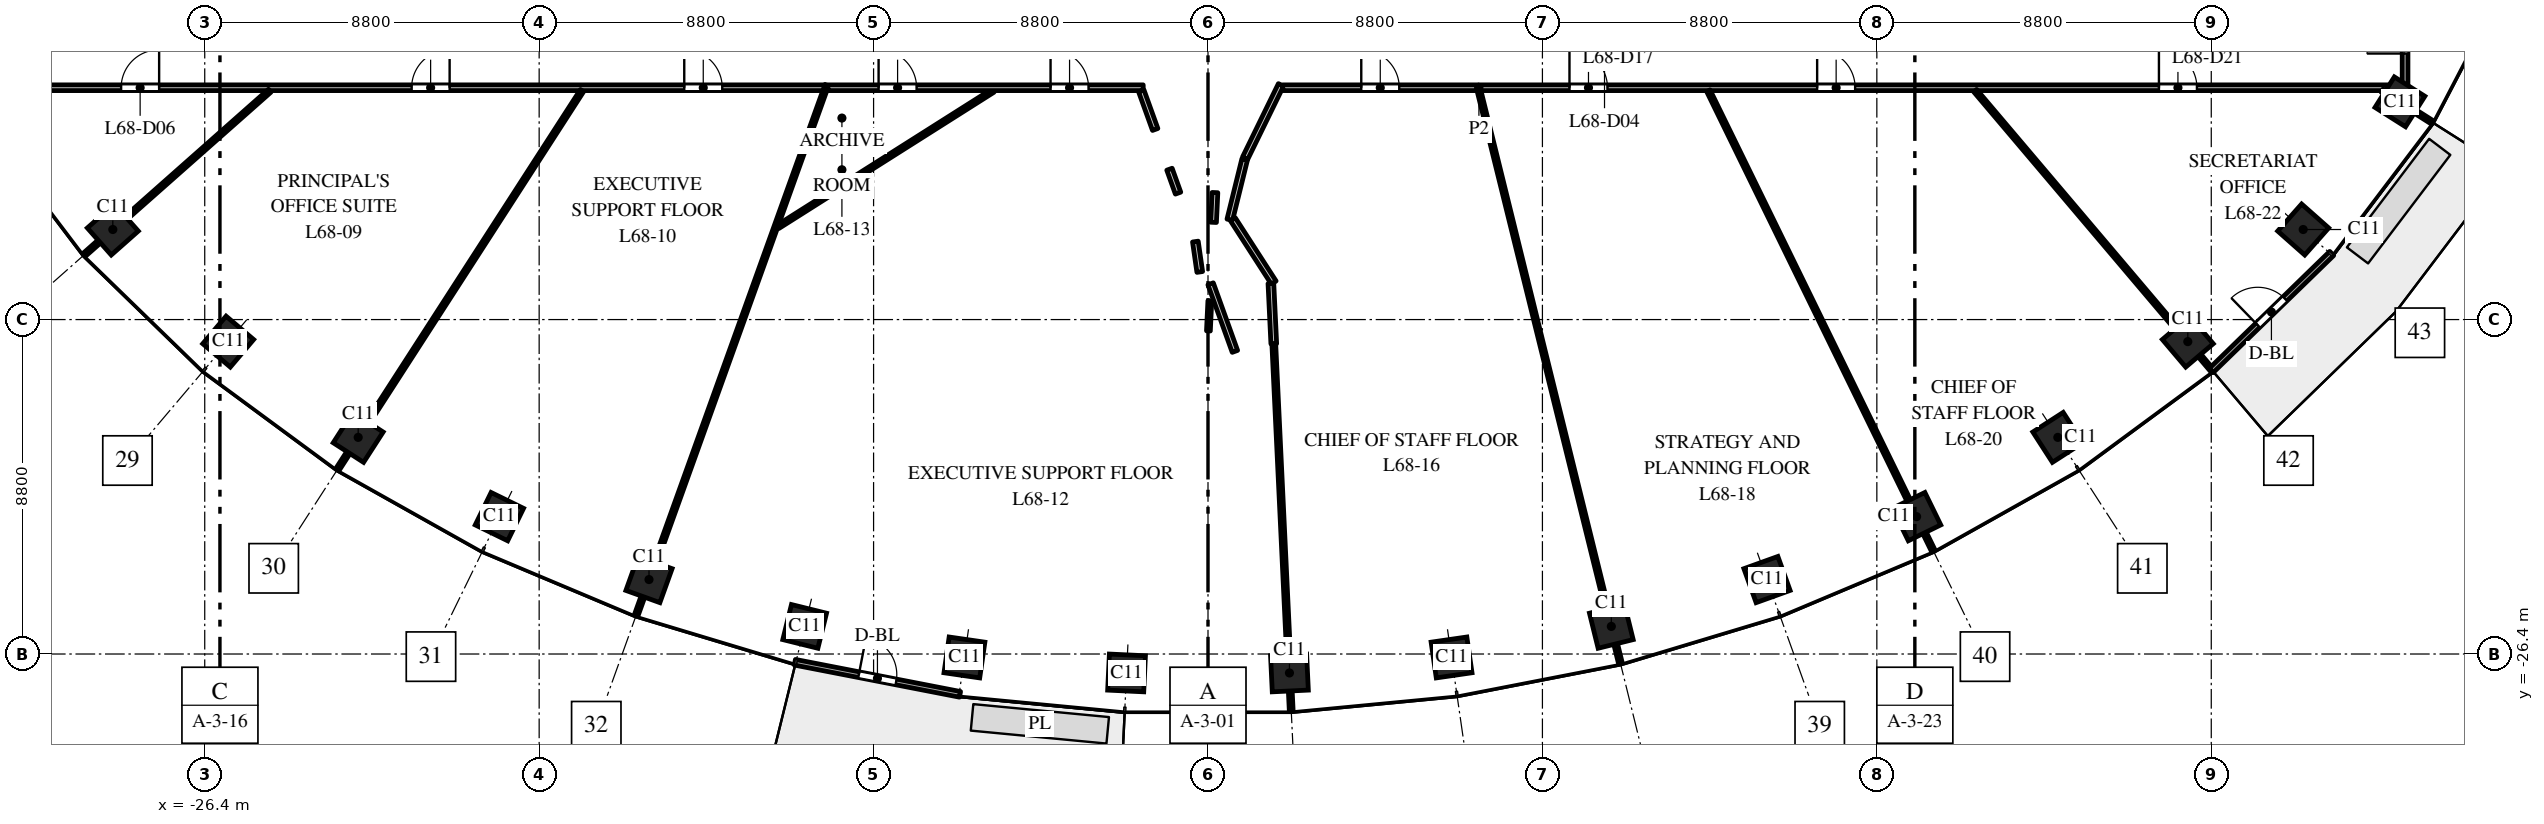
"""IFC4 building model, lengths in metres.
Left out: names, types, materials, properties, quantities, classifications, styles, units other than length and angle.
Written with IfcOpenShell. Run it as: python <this file> out.ifc"""

import sys

from ifc_helpers import new_model, si_unit, direction, frame, frame_2d, origin, origin_2d, place, context, subcontext, project, spatial, rectangle, extrude, element, fill, save


model = new_model("IFC4")
c1 = context("Model", 3, precision=1e-05, world=origin(), true_north=direction((0.0, 1.0)))
c2 = subcontext(c1, "Body", "Model", "MODEL_VIEW")
j1 = project(units=[si_unit("LENGTHUNIT", "METRE"), si_unit("PLANEANGLEUNIT", "RADIAN")], contexts=[c1])
p1 = place(None, origin())
s1 = spatial("IfcSite", under=j1, at=p1, CompositionType="ELEMENT")
p2 = place(p1, origin())
s2 = spatial("IfcBuilding", under=s1, at=p2, CompositionType="ELEMENT")
p3 = place(p2, frame((0.0, 0.0, 315.0)))
s3 = spatial("IfcBuildingStorey", under=s2, at=p3, CompositionType="ELEMENT", Elevation=315.0)
for number, where, z_axis, x_axis in (
    (1, (-28.819, -15.23, 0.0), (0.0, 0.0, 1.0), (0.663, -0.749, 0.0)),
    (2, (-25.783, -18.18, 0.0), (0.0, 0.0, 1.0), (0.763, -0.646, 0.0)),
    (3, (-22.362, -20.7, 0.0), (0.0, 0.0, 1.0), (0.84, -0.542, 0.0)),
    (4, (-18.646, -22.785, 0.0), (0.0, 0.0, 1.0), (0.898, -0.439, 0.0)),
    (5, (-14.709, -24.441, 0.0), (0.0, 0.0, 1.0), (0.941, -0.338, 0.0)),
    (6, (-10.613, -25.674, 0.0), (0.0, 0.0, 1.0), (0.971, -0.24, 0.0)),
    (7, (-6.409, -26.491, 0.0), (0.0, 0.0, 1.0), (0.99, -0.143, 0.0)),
    (8, (-2.143, -26.898, 0.0), (0.0, 0.0, 1.0), (0.999, -0.048, 0.0)),
    (9, (2.143, -26.898, 0.0), (0.0, 0.0, 1.0), (0.999, 0.048, 0.0)),
    (10, (6.409, -26.491, 0.0), (0.0, 0.0, 1.0), (0.99, 0.143, 0.0)),
    (11, (10.613, -25.674, 0.0), (0.0, 0.0, 1.0), (0.971, 0.24, 0.0)),
    (12, (14.709, -24.441, 0.0), (0.0, 0.0, 1.0), (0.941, 0.338, 0.0)),
    (13, (18.646, -22.785, 0.0), (0.0, 0.0, 1.0), (0.898, 0.439, 0.0)),
    (14, (22.362, -20.7, 0.0), (0.0, 0.0, 1.0), (0.84, 0.542, 0.0)),
    (15, (25.783, -18.18, 0.0), (0.0, 0.0, 1.0), (0.763, 0.646, 0.0)),
    (16, (28.819, -15.23, 0.0), (0.0, 0.0, 1.0), (0.663, 0.749, 0.0)),
    (17, (31.365, -11.871, 0.0), (0.0, 0.0, 1.0), (0.535, 0.845, 0.0)),
):
    element("IfcColumn", number, at=place(p3, frame(where, z_axis=z_axis, x_axis=x_axis)), inside=s3, PredefinedType="COLUMN", context=c2, shape_type="SweptSolid", body=[
        extrude(rectangle(XDim=0.95, YDim=0.95, at=origin_2d()), origin(), (0.0, 0.0, 1.0), 4.0),
    ])
p4 = place(p3, frame((-10.871, -26.617, 0.0), z_axis=(0.0, 0.0, 1.0), x_axis=(0.981631174778, -0.190788460615, 0.0)))
e18 = element("IfcWall", 18, at=p4, inside=s3, PredefinedType="STANDARD", context=c2, shape_type="SweptSolid", body=[
    extrude(rectangle(XDim=4.426, YDim=0.15, at=frame_2d((2.213, 0.0))), origin(), (0.0, 0.0, 1.0), 3.7),
])
p5 = place(p4, frame((1.713, 0.0, 0.0)))
e19 = element("IfcOpeningElement", 19, at=p5, cuts=e18, PredefinedType="OPENING", context=c2, shape_type="SweptSolid", body=[
    extrude(rectangle(XDim=1.0, YDim=2.4, at=frame_2d((0.5, 1.2))), frame((0.0, 0.085, 0.0), z_axis=(0.0, -1.0, 0.0), x_axis=(1.0, 0.0, 0.0)), (0.0, 0.0, 1.0), 0.17),
])
p6 = place(p3, frame((26.396, -18.943, 0.0), z_axis=(0.0, 0.0, 1.0), x_axis=(0.717214761864, 0.696852197647, 0.0)))
e20 = element("IfcWall", 20, at=p6, inside=s3, PredefinedType="STANDARD", context=c2, shape_type="SweptSolid", body=[
    extrude(rectangle(XDim=4.424, YDim=0.15, at=frame_2d((2.212, 0.0))), origin(), (0.0, 0.0, 1.0), 3.7),
])
p7 = place(p6, frame((1.712, 0.0, 0.0)))
e21 = element("IfcOpeningElement", 21, at=p7, cuts=e20, PredefinedType="OPENING", context=c2, shape_type="SweptSolid", body=[
    extrude(rectangle(XDim=1.0, YDim=2.4, at=frame_2d((0.5, 1.2))), frame((0.0, 0.085, 0.0), z_axis=(0.0, -1.0, 0.0), x_axis=(1.0, 0.0, 0.0)), (0.0, 0.0, 1.0), 0.17),
])
p8 = place(p3, frame((-31.5, -11.5, 0.0), z_axis=(0.0, 0.0, 1.0), x_axis=(1.0, 0.0, 0.0)))
e22 = element("IfcWall", 22, at=p8, inside=s3, PredefinedType="PARTITIONING", context=c2, shape_type="SweptSolid", body=[
    extrude(rectangle(XDim=21.432, YDim=0.15, at=frame_2d((10.716, 0.0))), origin(), (0.0, 0.0, 1.0), 2.75),
])
p9 = place(p8, frame((2.9, 0.0, 0.0)))
e23 = element("IfcOpeningElement", 23, at=p9, cuts=e22, PredefinedType="OPENING", context=c2, shape_type="SweptSolid", body=[
    extrude(rectangle(XDim=1.0, YDim=2.1, at=frame_2d((0.5, 1.05))), frame((0.0, 0.085, 0.0), z_axis=(0.0, -1.0, 0.0), x_axis=(1.0, 0.0, 0.0)), (0.0, 0.0, 1.0), 0.17),
])
p10 = place(p8, frame((10.544, 0.0, 0.0)))
e24 = element("IfcOpeningElement", 24, at=p10, cuts=e22, PredefinedType="OPENING", context=c2, shape_type="SweptSolid", body=[
    extrude(rectangle(XDim=1.0, YDim=2.1, at=frame_2d((0.5, 1.05))), frame((0.0, 0.085, 0.0), z_axis=(0.0, -1.0, 0.0), x_axis=(1.0, 0.0, 0.0)), (0.0, 0.0, 1.0), 0.17),
])
p11 = place(p8, frame((17.718, 0.0, 0.0)))
e25 = element("IfcOpeningElement", 25, at=p11, cuts=e22, PredefinedType="OPENING", context=c2, shape_type="SweptSolid", body=[
    extrude(rectangle(XDim=1.0, YDim=2.1, at=frame_2d((0.5, 1.05))), frame((0.0, 0.085, 0.0), z_axis=(0.0, -1.0, 0.0), x_axis=(1.0, 0.0, 0.0)), (0.0, 0.0, 1.0), 0.17),
])
p12 = place(p3, frame((-29.569, -15.895, 0.0), z_axis=(0.0, 0.0, 1.0), x_axis=(0.748988695283, 0.662582775461, 0.0)))
e26 = element("IfcWall", 26, at=p12, inside=s3, PredefinedType="PARTITIONING", context=c2, shape_type="SweptSolid", body=[
    extrude(rectangle(XDim=6.516, YDim=0.1, at=frame_2d((3.258, 0.0))), origin(), (0.0, 0.0, 1.0), 3.0),
])
p13 = place(p3, frame((-22.905, -21.542, 0.0), z_axis=(0.0, 0.0, 1.0), x_axis=(0.54229092728, 0.840190782019, 0.0)))
e27 = element("IfcWall", 27, at=p13, inside=s3, PredefinedType="PARTITIONING", context=c2, shape_type="SweptSolid", body=[
    extrude(rectangle(XDim=11.863, YDim=0.1, at=frame_2d((5.931, 0.0))), origin(), (0.0, 0.0, 1.0), 2.75),
])
p14 = place(p3, frame((-15.047, -25.383, 0.0), z_axis=(0.0, 0.0, 1.0), x_axis=(0.338338153279, 0.941024597997, 0.0)))
e28 = element("IfcWall", 28, at=p14, inside=s3, PredefinedType="PARTITIONING", context=c2, shape_type="SweptSolid", body=[
    extrude(rectangle(XDim=14.829, YDim=0.1, at=frame_2d((7.414, 0.0))), origin(), (0.0, 0.0, 1.0), 2.75),
])
p15 = place(p3, frame((-11.319, -15.161, 0.0), z_axis=(0.0, 0.0, 1.0), x_axis=(0.844865171483, 0.534979291203, 0.0)))
e29 = element("IfcWall", 29, at=p15, inside=s3, PredefinedType="PARTITIONING", context=c2, shape_type="SweptSolid", body=[
    extrude(rectangle(XDim=6.703, YDim=0.1, at=frame_2d((3.352, 0.0))), origin(), (0.0, 0.0, 1.0), 3.7),
])
p16 = place(p3, frame((-10.003, -11.5, 0.0), z_axis=(0.0, 0.0, 1.0), x_axis=(1.0, 0.0, 0.0)))
e30 = element("IfcWall", 30, at=p16, inside=s3, PredefinedType="PARTITIONING", context=c2, shape_type="SweptSolid", body=[
    extrude(rectangle(XDim=8.298, YDim=0.15, at=frame_2d((4.149, 0.0))), origin(), (0.0, 0.0, 1.0), 2.75),
])
p17 = place(p16, frame((5.86, 0.0, 0.0)))
e31 = element("IfcOpeningElement", 31, at=p17, cuts=e30, PredefinedType="OPENING", context=c2, shape_type="SweptSolid", body=[
    extrude(rectangle(XDim=1.0, YDim=2.1, at=frame_2d((0.5, 1.05))), frame((0.0, 0.085, 0.0), z_axis=(0.0, -1.0, 0.0), x_axis=(1.0, 0.0, 0.0)), (0.0, 0.0, 1.0), 0.17),
])
p18 = place(p16, frame((1.335, 0.0, 0.0)))
e32 = element("IfcOpeningElement", 32, at=p18, cuts=e30, PredefinedType="OPENING", context=c2, shape_type="SweptSolid", body=[
    extrude(rectangle(XDim=1.0, YDim=2.1, at=frame_2d((0.5, 1.05))), frame((0.0, 0.085, 0.0), z_axis=(0.0, -1.0, 0.0), x_axis=(1.0, 0.0, 0.0)), (0.0, 0.0, 1.0), 0.17),
])
p19 = place(p3, frame((-1.757, -11.579, 0.0), z_axis=(0.0, 0.0, 1.0), x_axis=(0.339062715819, -0.940763772018, 0.0)))
e33 = element("IfcWall", 33, at=p19, inside=s3, PredefinedType="PARTITIONING", context=c2, shape_type="SweptSolid", body=[
    extrude(rectangle(XDim=1.083, YDim=0.15, at=frame_2d((0.542, 0.0))), origin(), (0.0, 0.0, 1.0), 3.7),
])
p20 = place(p3, frame((-1.014, -13.644, 0.0), z_axis=(0.0, 0.0, 1.0), x_axis=(0.33795603829, -0.941161896904, 0.0)))
e34 = element("IfcWall", 34, at=p20, inside=s3, PredefinedType="PARTITIONING", context=c2, shape_type="SweptSolid", body=[
    extrude(rectangle(XDim=0.668, YDim=0.15, at=frame_2d((0.334, 0.0))), origin(), (0.0, 0.0, 1.0), 2.85),
])
p21 = place(p3, frame((-0.332, -15.548, 0.0), z_axis=(0.0, 0.0, 1.0), x_axis=(0.14248004426, -0.989797674774, 0.0)))
e35 = element("IfcWall", 35, at=p21, inside=s3, PredefinedType="PARTITIONING", context=c2, shape_type="SweptSolid", body=[
    extrude(rectangle(XDim=0.807, YDim=0.15, at=frame_2d((0.404, 0.0))), origin(), (0.0, 0.0, 1.0), 3.7),
])
p22 = place(p3, frame((0.011, -17.899, 0.0), z_axis=(0.0, 0.0, 1.0), x_axis=(0.046862039633, 0.998901371128, 0.0)))
e36 = element("IfcWall", 36, at=p22, inside=s3, PredefinedType="PARTITIONING", context=c2, shape_type="SweptSolid", body=[
    extrude(rectangle(XDim=0.792, YDim=0.1, at=frame_2d((0.396, 0.0))), origin(), (0.0, 0.0, 1.0), 3.7),
])
p23 = place(p3, frame((0.069, -16.659, 0.0), z_axis=(0.0, 0.0, 1.0), x_axis=(0.3381611761, -0.941088209988, 0.0)))
e37 = element("IfcWall", 37, at=p23, inside=s3, PredefinedType="PARTITIONING", context=c2, shape_type="SweptSolid", body=[
    extrude(rectangle(XDim=1.889, YDim=0.15, at=frame_2d((0.945, 0.0))), origin(), (0.0, 0.0, 1.0), 3.7),
])
p24 = place(p3, frame((0.146, -15.042, 0.0), z_axis=(0.0, 0.0, 1.0), x_axis=(0.047343174261, 0.99887868325, 0.0)))
e38 = element("IfcWall", 38, at=p24, inside=s3, PredefinedType="PARTITIONING", context=c2, shape_type="SweptSolid", body=[
    extrude(rectangle(XDim=0.784, YDim=0.15, at=frame_2d((0.392, 0.0))), origin(), (0.0, 0.0, 1.0), 3.7),
])
p25 = place(p3, frame((0.573, -14.974, 0.0), z_axis=(0.0, 0.0, 1.0), x_axis=(0.239690117004, 0.970849446521, 0.0)))
e39 = element("IfcWall", 39, at=p25, inside=s3, PredefinedType="PARTITIONING", context=c2, shape_type="SweptSolid", body=[
    extrude(rectangle(XDim=1.636, YDim=0.15, at=frame_2d((0.818, 0.0))), origin(), (0.0, 0.0, 1.0), 3.7),
])
p26 = place(p3, frame((0.654, -14.961, 0.0), z_axis=(0.0, 0.0, 1.0), x_axis=(0.542163330295, -0.840273124218, 0.0)))
e40 = element("IfcWall", 40, at=p26, inside=s3, PredefinedType="PARTITIONING", context=c2, shape_type="SweptSolid", body=[
    extrude(rectangle(XDim=1.983, YDim=0.15, at=frame_2d((0.991, 0.0))), origin(), (0.0, 0.0, 1.0), 3.7),
])
p27 = place(p3, frame((0.977, -13.353, 0.0), z_axis=(0.0, 0.0, 1.0), x_axis=(0.439324382849, 0.898328495949, 0.0)))
e41 = element("IfcWall", 41, at=p27, inside=s3, PredefinedType="PARTITIONING", context=c2, shape_type="SweptSolid", body=[
    extrude(rectangle(XDim=2.146, YDim=0.15, at=frame_2d((1.073, 0.0))), origin(), (0.0, 0.0, 1.0), 3.7),
])
p28 = place(p3, frame((1.655, -16.65, 0.0), z_axis=(0.0, 0.0, 1.0), x_axis=(0.047784147069, -0.998857685203, 0.0)))
e42 = element("IfcWall", 42, at=p28, inside=s3, PredefinedType="PARTITIONING", context=c2, shape_type="SweptSolid", body=[
    extrude(rectangle(XDim=1.589, YDim=0.15, at=frame_2d((0.794, 0.0))), origin(), (0.0, 0.0, 1.0), 3.7),
])
p29 = place(p3, frame((1.731, -18.237, 0.0), z_axis=(0.0, 0.0, 1.0), x_axis=(0.047456012182, -0.99887332876, 0.0)))
e43 = element("IfcWall", 43, at=p29, inside=s3, PredefinedType="PARTITIONING", context=c2, shape_type="SweptSolid", body=[
    extrude(rectangle(XDim=9.672, YDim=0.1, at=frame_2d((4.836, 0.0))), origin(), (0.0, 0.0, 1.0), 3.0),
])
p30 = place(p3, frame((1.966, -11.5, 0.0), z_axis=(0.0, 0.0, 1.0), x_axis=(1.0, 0.0, 0.0)))
e44 = element("IfcWall", 44, at=p30, inside=s3, PredefinedType="PARTITIONING", context=c2, shape_type="SweptSolid", body=[
    extrude(rectangle(XDim=5.146, YDim=0.15, at=frame_2d((2.573, 0.0))), origin(), (0.0, 0.0, 1.0), 2.85),
])
p31 = place(p30, frame((2.067, 0.0, 0.0)))
e45 = element("IfcOpeningElement", 45, at=p31, cuts=e44, PredefinedType="OPENING", context=c2, shape_type="SweptSolid", body=[
    extrude(rectangle(XDim=1.0, YDim=2.1, at=frame_2d((0.5, 1.05))), frame((0.0, 0.085, 0.0), z_axis=(0.0, -1.0, 0.0), x_axis=(1.0, 0.0, 0.0)), (0.0, 0.0, 1.0), 0.17),
])
p32 = place(p3, frame((7.112, -11.5, 0.0), z_axis=(0.0, 0.0, 1.0), x_axis=(0.239787813873, -0.970825321218, 0.0)))
e46 = element("IfcWall", 46, at=p32, inside=s3, PredefinedType="PARTITIONING", context=c2, shape_type="SweptSolid", body=[
    extrude(rectangle(XDim=15.601, YDim=0.1, at=frame_2d((7.801, 0.0))), origin(), (0.0, 0.0, 1.0), 2.85),
])
p33 = place(p3, frame((7.129, -11.5, 0.0), z_axis=(0.0, 0.0, 1.0), x_axis=(1.0, 0.0, 0.0)))
e47 = element("IfcWall", 47, at=p33, inside=s3, PredefinedType="PARTITIONING", context=c2, shape_type="SweptSolid", body=[
    extrude(rectangle(XDim=24.371, YDim=0.15, at=frame_2d((12.186, 0.0))), origin(), (0.0, 0.0, 1.0), 2.75),
])
p34 = place(p33, frame((2.383, 0.0, 0.0)))
e48 = element("IfcOpeningElement", 48, at=p34, cuts=e47, PredefinedType="OPENING", context=c2, shape_type="SweptSolid", body=[
    extrude(rectangle(XDim=1.0, YDim=2.1, at=frame_2d((0.5, 1.05))), frame((0.0, 0.085, 0.0), z_axis=(0.0, -1.0, 0.0), x_axis=(1.0, 0.0, 0.0)), (0.0, 0.0, 1.0), 0.17),
])
p35 = place(p33, frame((8.9, 0.0, 0.0)))
e49 = element("IfcOpeningElement", 49, at=p35, cuts=e47, PredefinedType="OPENING", context=c2, shape_type="SweptSolid", body=[
    extrude(rectangle(XDim=1.0, YDim=2.1, at=frame_2d((0.5, 1.05))), frame((0.0, 0.085, 0.0), z_axis=(0.0, -1.0, 0.0), x_axis=(1.0, 0.0, 0.0)), (0.0, 0.0, 1.0), 0.17),
])
p36 = place(p33, frame((17.894, 0.0, 0.0)))
e50 = element("IfcOpeningElement", 50, at=p36, cuts=e47, PredefinedType="OPENING", context=c2, shape_type="SweptSolid", body=[
    extrude(rectangle(XDim=1.0, YDim=2.1, at=frame_2d((0.5, 1.05))), frame((0.0, 0.085, 0.0), z_axis=(0.0, -1.0, 0.0), x_axis=(1.0, 0.0, 0.0)), (0.0, 0.0, 1.0), 0.17),
])
p37 = place(p3, frame((13.167, -11.579, 0.0), z_axis=(0.0, 0.0, 1.0), x_axis=(0.439238726833, -0.898370380661, 0.0)))
e51 = element("IfcWall", 51, at=p37, inside=s3, PredefinedType="PARTITIONING", context=c2, shape_type="SweptSolid", body=[
    extrude(rectangle(XDim=13.475, YDim=0.1, at=frame_2d((6.738, 0.0))), origin(), (0.0, 0.0, 1.0), 3.0),
])
p38 = place(p3, frame((20.189, -11.578, 0.0), z_axis=(0.0, 0.0, 1.0), x_axis=(0.646376264927, -0.763018822926, 0.0)))
e52 = element("IfcWall", 52, at=p38, inside=s3, PredefinedType="PARTITIONING", context=c2, shape_type="SweptSolid", body=[
    extrude(rectangle(XDim=9.655, YDim=0.1, at=frame_2d((4.828, 0.0))), origin(), (0.0, 0.0, 1.0), 3.0),
])
p39 = place(p3, frame((30.897, -11.575, 0.0), z_axis=(0.0, 0.0, 1.0), x_axis=(0.844757626245, -0.535149094086, 0.0)))
e53 = element("IfcWall", 53, at=p39, inside=s3, PredefinedType="PARTITIONING", context=c2, shape_type="SweptSolid", body=[
    extrude(rectangle(XDim=1.557, YDim=0.1, at=frame_2d((0.778, 0.0))), origin(), (0.0, 0.0, 1.0), 3.0),
])
p40 = place(p3, frame((31.5, -11.5, 0.0), z_axis=(0.0, 0.0, 1.0), x_axis=(0.0, 1.0, 0.0)))
e54 = element("IfcWall", 54, at=p40, inside=s3, PredefinedType="PARTITIONING", context=c2, shape_type="SweptSolid", body=[
    extrude(rectangle(XDim=3.0, YDim=0.15, at=frame_2d((1.5, 0.0))), origin(), (0.0, 0.0, 1.0), 3.0),
])
p41 = place(p40, frame((0.9, 0.0, 0.0)))
e55 = element("IfcOpeningElement", 55, at=p41, cuts=e54, PredefinedType="OPENING", context=c2, shape_type="SweptSolid", body=[
    extrude(rectangle(XDim=1.0, YDim=2.1, at=frame_2d((0.5, 1.05))), frame((0.0, 0.085, 0.0), z_axis=(0.0, -1.0, 0.0), x_axis=(1.0, 0.0, 0.0)), (0.0, 0.0, 1.0), 0.17),
])
p42 = place(p5, origin())
e56 = element("IfcDoor", 56, at=p42, inside=s3, OperationType="SINGLE_SWING_LEFT", PredefinedType="DOOR", context=c2, shape_type="SweptSolid", body=[
    extrude(rectangle(XDim=1.0, YDim=2.4, at=frame_2d((0.5, 1.2))), frame((0.0, 0.025, 0.0), z_axis=(0.0, -1.0, 0.0), x_axis=(1.0, 0.0, 0.0)), (0.0, 0.0, 1.0), 0.05),
])
fill(e19, e56)
p43 = place(p7, origin())
e57 = element("IfcDoor", 57, at=p43, inside=s3, OperationType="SINGLE_SWING_LEFT", PredefinedType="DOOR", context=c2, shape_type="SweptSolid", body=[
    extrude(rectangle(XDim=1.0, YDim=2.4, at=frame_2d((0.5, 1.2))), frame((0.0, 0.025, 0.0), z_axis=(0.0, -1.0, 0.0), x_axis=(1.0, 0.0, 0.0)), (0.0, 0.0, 1.0), 0.05),
])
fill(e21, e57)
p44 = place(p9, origin())
e58 = element("IfcDoor", 58, at=p44, inside=s3, OperationType="SINGLE_SWING_RIGHT", PredefinedType="DOOR", context=c2, shape_type="SweptSolid", body=[
    extrude(rectangle(XDim=1.0, YDim=2.1, at=frame_2d((0.5, 1.05))), frame((0.0, 0.025, 0.0), z_axis=(0.0, -1.0, 0.0), x_axis=(1.0, 0.0, 0.0)), (0.0, 0.0, 1.0), 0.05),
])
fill(e23, e58)
p45 = place(p10, origin())
e59 = element("IfcDoor", 59, at=p45, inside=s3, OperationType="SINGLE_SWING_RIGHT", PredefinedType="DOOR", context=c2, shape_type="SweptSolid", body=[
    extrude(rectangle(XDim=1.0, YDim=2.1, at=frame_2d((0.5, 1.05))), frame((0.0, 0.025, 0.0), z_axis=(0.0, -1.0, 0.0), x_axis=(1.0, 0.0, 0.0)), (0.0, 0.0, 1.0), 0.05),
])
fill(e24, e59)
p46 = place(p11, origin())
e60 = element("IfcDoor", 60, at=p46, inside=s3, OperationType="SINGLE_SWING_LEFT", PredefinedType="DOOR", context=c2, shape_type="SweptSolid", body=[
    extrude(rectangle(XDim=1.0, YDim=2.1, at=frame_2d((0.5, 1.05))), frame((0.0, 0.025, 0.0), z_axis=(0.0, -1.0, 0.0), x_axis=(1.0, 0.0, 0.0)), (0.0, 0.0, 1.0), 0.05),
])
fill(e25, e60)
p47 = place(p17, origin())
e61 = element("IfcDoor", 61, at=p47, inside=s3, OperationType="SINGLE_SWING_LEFT", PredefinedType="DOOR", context=c2, shape_type="SweptSolid", body=[
    extrude(rectangle(XDim=1.0, YDim=2.1, at=frame_2d((0.5, 1.05))), frame((0.0, 0.025, 0.0), z_axis=(0.0, -1.0, 0.0), x_axis=(1.0, 0.0, 0.0)), (0.0, 0.0, 1.0), 0.05),
])
fill(e31, e61)
p48 = place(p18, origin())
e62 = element("IfcDoor", 62, at=p48, inside=s3, OperationType="SINGLE_SWING_LEFT", PredefinedType="DOOR", context=c2, shape_type="SweptSolid", body=[
    extrude(rectangle(XDim=1.0, YDim=2.1, at=frame_2d((0.5, 1.05))), frame((0.0, 0.025, 0.0), z_axis=(0.0, -1.0, 0.0), x_axis=(1.0, 0.0, 0.0)), (0.0, 0.0, 1.0), 0.05),
])
fill(e32, e62)
p49 = place(p31, origin())
e63 = element("IfcDoor", 63, at=p49, inside=s3, OperationType="SINGLE_SWING_LEFT", PredefinedType="DOOR", context=c2, shape_type="SweptSolid", body=[
    extrude(rectangle(XDim=1.0, YDim=2.1, at=frame_2d((0.5, 1.05))), frame((0.0, 0.025, 0.0), z_axis=(0.0, -1.0, 0.0), x_axis=(1.0, 0.0, 0.0)), (0.0, 0.0, 1.0), 0.05),
])
fill(e45, e63)
p50 = place(p34, origin())
e64 = element("IfcDoor", 64, at=p50, inside=s3, OperationType="SINGLE_SWING_LEFT", PredefinedType="DOOR", context=c2, shape_type="SweptSolid", body=[
    extrude(rectangle(XDim=1.0, YDim=2.1, at=frame_2d((0.5, 1.05))), frame((0.0, 0.025, 0.0), z_axis=(0.0, -1.0, 0.0), x_axis=(1.0, 0.0, 0.0)), (0.0, 0.0, 1.0), 0.05),
])
fill(e48, e64)
p51 = place(p35, origin())
e65 = element("IfcDoor", 65, at=p51, inside=s3, OperationType="SINGLE_SWING_LEFT", PredefinedType="DOOR", context=c2, shape_type="SweptSolid", body=[
    extrude(rectangle(XDim=1.0, YDim=2.1, at=frame_2d((0.5, 1.05))), frame((0.0, 0.025, 0.0), z_axis=(0.0, -1.0, 0.0), x_axis=(1.0, 0.0, 0.0)), (0.0, 0.0, 1.0), 0.05),
])
fill(e49, e65)
p52 = place(p36, origin())
e66 = element("IfcDoor", 66, at=p52, inside=s3, OperationType="SINGLE_SWING_LEFT", PredefinedType="DOOR", context=c2, shape_type="SweptSolid", body=[
    extrude(rectangle(XDim=1.0, YDim=2.1, at=frame_2d((0.5, 1.05))), frame((0.0, 0.025, 0.0), z_axis=(0.0, -1.0, 0.0), x_axis=(1.0, 0.0, 0.0)), (0.0, 0.0, 1.0), 0.05),
])
fill(e50, e66)
p53 = place(p41, origin())
e67 = element("IfcDoor", 67, at=p53, inside=s3, OperationType="SINGLE_SWING_LEFT", PredefinedType="DOOR", context=c2, shape_type="SweptSolid", body=[
    extrude(rectangle(XDim=1.0, YDim=2.1, at=frame_2d((0.5, 1.05))), frame((0.0, 0.025, 0.0), z_axis=(0.0, -1.0, 0.0), x_axis=(1.0, 0.0, 0.0)), (0.0, 0.0, 1.0), 0.05),
])
fill(e55, e67)
save(model, sys.argv[1])
